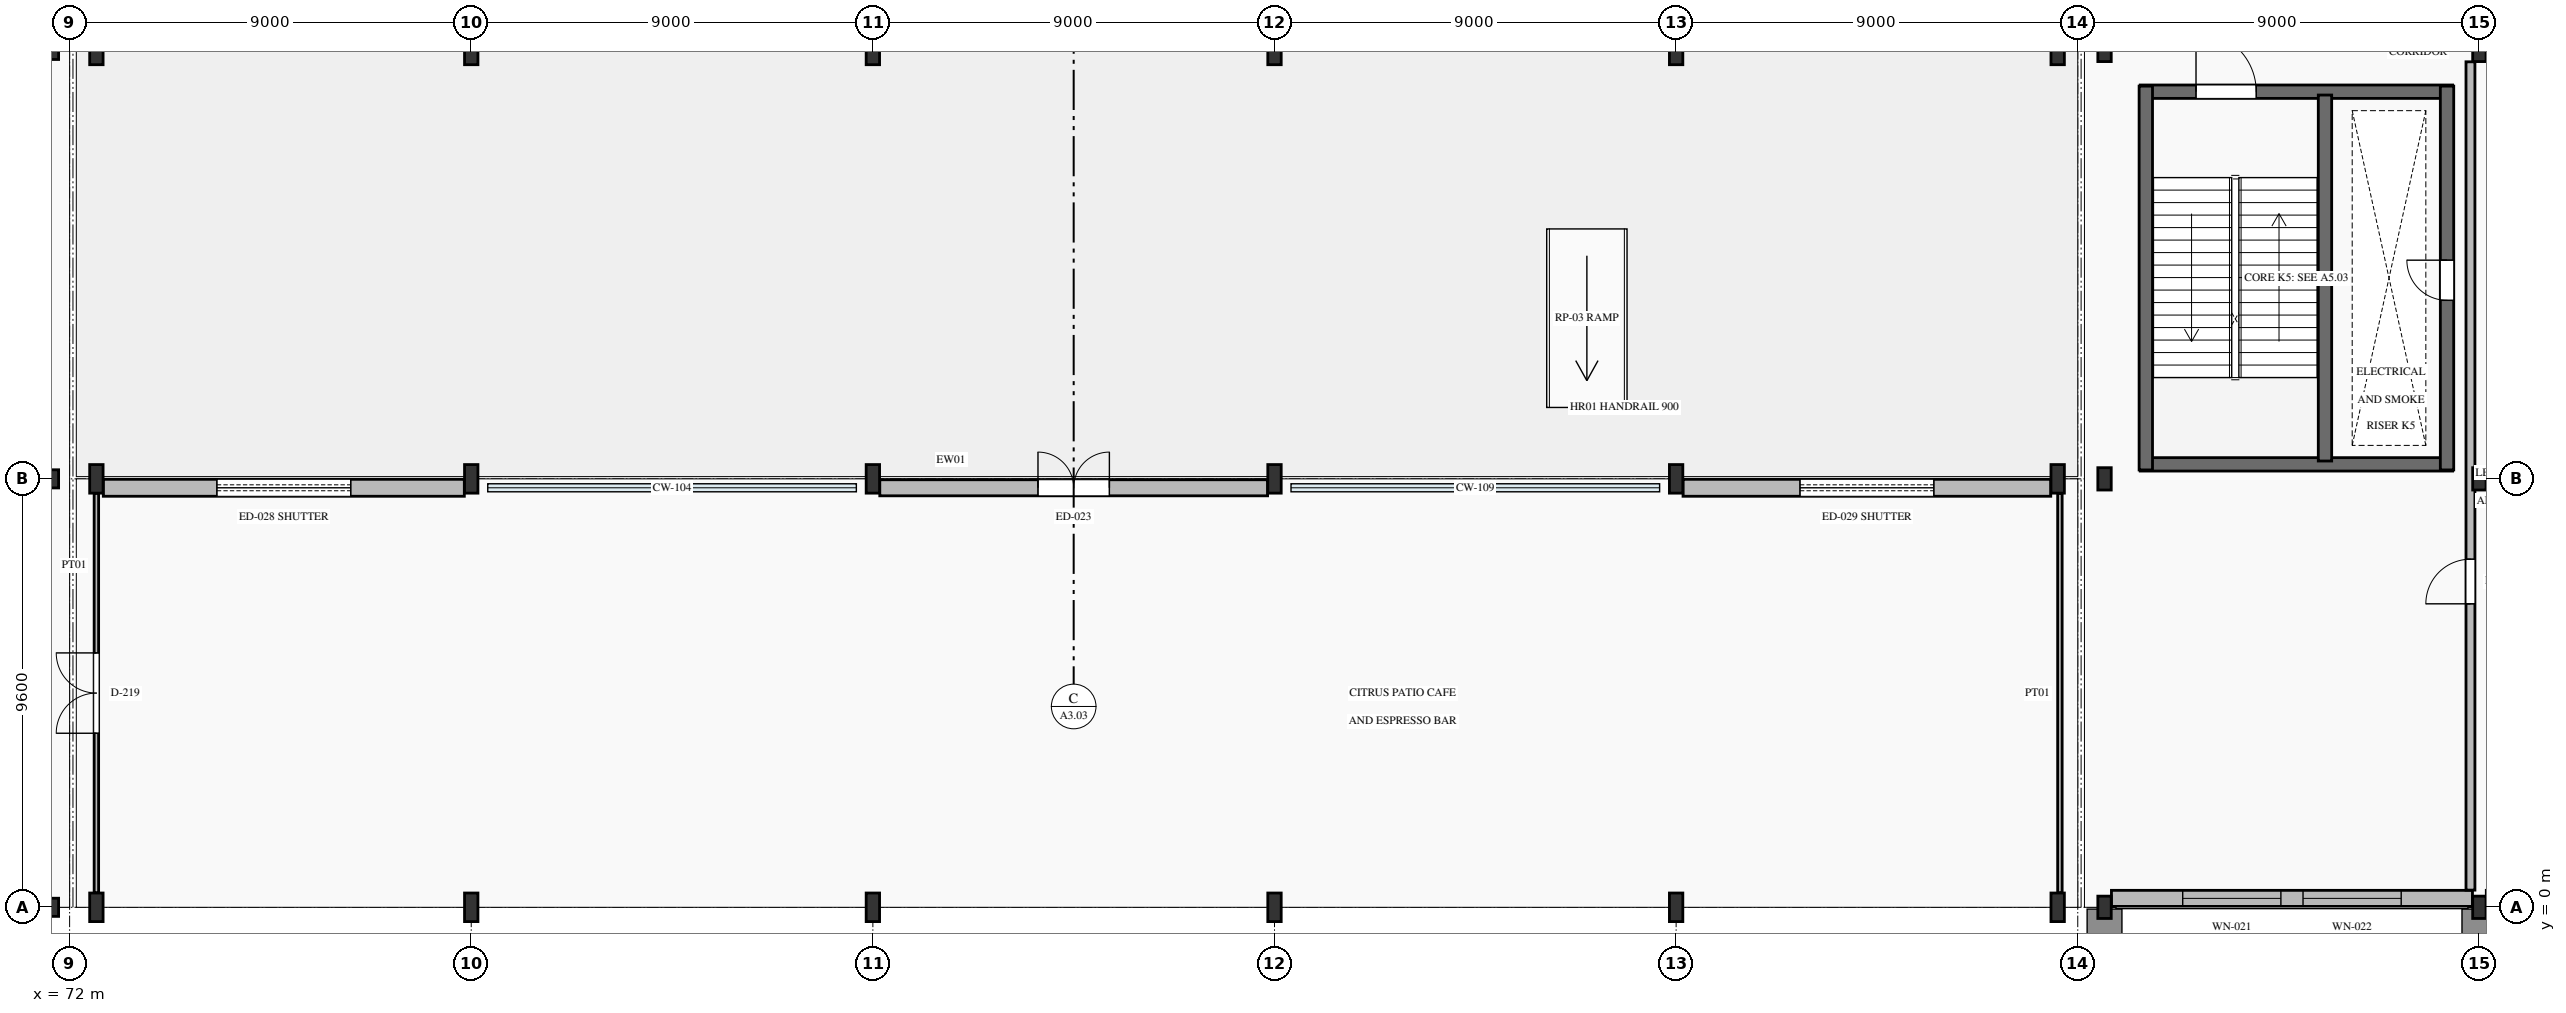
"""IFC4 building model, lengths in metres.
Left out: names, types, materials, properties, quantities, classifications, styles, units other than length and angle.
Written with IfcOpenShell. Run it as: python <this file> out.ifc"""

import sys

from ifc_helpers import new_model, si_unit, direction, frame, frame_2d, origin, origin_2d, place, context, subcontext, project, spatial, rectangle, hollow_circle, i_section, extrude, element, fill, save


model = new_model("IFC4")
c1 = context("Model", 3, precision=1e-05, world=origin(), true_north=direction((0.0, 1.0)))
c2 = subcontext(c1, "Body", "Model", "MODEL_VIEW")
j1 = project(units=[si_unit("LENGTHUNIT", "METRE"), si_unit("PLANEANGLEUNIT", "RADIAN")], contexts=[c1])
p1 = place(None, origin())
s1 = spatial("IfcSite", under=j1, at=p1, CompositionType="ELEMENT")
p2 = place(p1, origin())
s2 = spatial("IfcBuilding", under=s1, at=p2, CompositionType="ELEMENT")
p3 = place(p2, origin())
s3 = spatial("IfcBuildingStorey", under=s2, at=p3, CompositionType="ELEMENT", Elevation=0.0)
for number, where, z_axis, x_axis in (
    (1, (71.55, 0.0, 0.0), (0.0, 0.0, 1.0), (1.0, 0.0, 0.0)),
    (2, (71.55, 9.6, 0.0), (0.0, 0.0, 1.0), (1.0, 0.0, 0.0)),
    (3, (71.55, 19.2, 0.0), (0.0, 0.0, 1.0), (1.0, 0.0, 0.0)),
):
    element("IfcColumn", number, at=place(p3, frame(where, z_axis=z_axis, x_axis=x_axis)), inside=s3, PredefinedType="COLUMN", context=c2, shape_type="SweptSolid", body=[
        extrude(hollow_circle(Radius=0.203, WallThickness=0.02, at=origin_2d()), origin(), (0.0, 0.0, 1.0), 6.0),
    ])
for number, where, z_axis, x_axis in (
    (4, (72.6, 0.0, 0.0), (0.0, 0.0, 1.0), (1.0, 0.0, 0.0)),
    (5, (72.6, 9.6, 0.0), (0.0, 0.0, 1.0), (1.0, 0.0, 0.0)),
    (6, (72.6, 19.2, 0.0), (0.0, 0.0, 1.0), (1.0, 0.0, 0.0)),
    (7, (81.0, 0.0, 0.0), (0.0, 0.0, 1.0), (1.0, 0.0, 0.0)),
    (8, (81.0, 9.6, 0.0), (0.0, 0.0, 1.0), (1.0, 0.0, 0.0)),
    (9, (81.0, 19.2, 0.0), (0.0, 0.0, 1.0), (1.0, 0.0, 0.0)),
    (10, (90.0, 0.0, 0.0), (0.0, 0.0, 1.0), (1.0, 0.0, 0.0)),
    (11, (90.0, 9.6, 0.0), (0.0, 0.0, 1.0), (1.0, 0.0, 0.0)),
    (12, (90.0, 19.2, 0.0), (0.0, 0.0, 1.0), (1.0, 0.0, 0.0)),
    (13, (99.0, 0.0, 0.0), (0.0, 0.0, 1.0), (1.0, 0.0, 0.0)),
    (14, (99.0, 9.6, 0.0), (0.0, 0.0, 1.0), (1.0, 0.0, 0.0)),
    (15, (99.0, 19.2, 0.0), (0.0, 0.0, 1.0), (1.0, 0.0, 0.0)),
    (16, (108.0, 0.0, 0.0), (0.0, 0.0, 1.0), (1.0, 0.0, 0.0)),
    (17, (108.0, 9.6, 0.0), (0.0, 0.0, 1.0), (1.0, 0.0, 0.0)),
    (18, (108.0, 19.2, 0.0), (0.0, 0.0, 1.0), (1.0, 0.0, 0.0)),
    (19, (116.55, 0.0, 0.0), (0.0, 0.0, 1.0), (1.0, 0.0, 0.0)),
    (20, (116.55, 9.6, 0.0), (0.0, 0.0, 1.0), (1.0, 0.0, 0.0)),
    (21, (116.55, 19.2, 0.0), (0.0, 0.0, 1.0), (1.0, 0.0, 0.0)),
):
    element("IfcColumn", number, at=place(p3, frame(where, z_axis=z_axis, x_axis=x_axis)), inside=s3, PredefinedType="COLUMN", context=c2, shape_type="SweptSolid", body=[
        extrude(i_section(OverallWidth=0.3, OverallDepth=0.64, WebThickness=0.013, FlangeThickness=0.026, FilletRadius=0.027, at=origin_2d()), origin(), (0.0, 0.0, 1.0), 6.0),
    ])
for number, where, z_axis, x_axis in (
    (22, (117.6, 0.0, 0.0), (0.0, 0.0, 1.0), (1.0, 0.0, 0.0)),
    (23, (117.6, 9.6, 0.0), (0.0, 0.0, 1.0), (1.0, 0.0, 0.0)),
    (24, (117.6, 19.2, 0.0), (0.0, 0.0, 1.0), (1.0, 0.0, 0.0)),
    (25, (126.0, 0.0, 0.0), (0.0, 0.0, 1.0), (1.0, 0.0, 0.0)),
    (26, (126.0, 9.6, 0.0), (0.0, 0.0, 1.0), (1.0, 0.0, 0.0)),
    (27, (126.0, 19.2, 0.0), (0.0, 0.0, 1.0), (1.0, 0.0, 0.0)),
):
    element("IfcColumn", number, at=place(p3, frame(where, z_axis=z_axis, x_axis=x_axis)), inside=s3, PredefinedType="COLUMN", context=c2, shape_type="SweptSolid", body=[
        extrude(i_section(OverallWidth=0.3, OverallDepth=0.5, WebThickness=0.014, FlangeThickness=0.028, FilletRadius=0.027, at=origin_2d()), origin(), (0.0, 0.0, 1.0), 6.0),
    ])
p4 = place(p3, frame((90.155, 9.4, 0.0), z_axis=(0.0, 0.0, 1.0), x_axis=(1.0, 0.0, 0.0)))
e28 = element("IfcWall", 28, at=p4, inside=s3, PredefinedType="SOLIDWALL", context=c2, shape_type="SweptSolid", body=[
    extrude(rectangle(XDim=8.69, YDim=0.36, at=frame_2d((4.345, 0.0))), origin(), (0.0, 0.0, 1.0), 5.34),
])
p5 = place(p4, frame((3.545, 0.0, 0.0)))
e29 = element("IfcOpeningElement", 29, at=p5, cuts=e28, PredefinedType="OPENING", context=c2, shape_type="SweptSolid", body=[
    extrude(rectangle(XDim=1.6, YDim=2.4, at=frame_2d((0.8, 1.2))), frame((0.0, 0.195, 0.0), z_axis=(0.0, -1.0, 0.0), x_axis=(1.0, 0.0, 0.0)), (0.0, 0.0, 1.0), 0.39),
])
p6 = place(p3, frame((117.755, 0.2, 0.0), z_axis=(0.0, 0.0, 1.0), x_axis=(1.0, 0.0, 0.0)))
e30 = element("IfcWall", 30, at=p6, inside=s3, PredefinedType="SOLIDWALL", context=c2, shape_type="SweptSolid", body=[
    extrude(rectangle(XDim=8.09, YDim=0.36, at=frame_2d((4.045, 0.0))), origin(), (0.0, 0.0, 1.0), 5.49),
])
p7 = place(p6, frame((1.597, 0.0, 0.95)))
e31 = element("IfcOpeningElement", 31, at=p7, cuts=e30, PredefinedType="OPENING", context=c2, shape_type="SweptSolid", body=[
    extrude(rectangle(XDim=2.2, YDim=2.6, at=frame_2d((1.1, 1.3))), frame((0.0, 0.195, 0.0), z_axis=(0.0, -1.0, 0.0), x_axis=(1.0, 0.0, 0.0)), (0.0, 0.0, 1.0), 0.39),
])
p8 = place(p6, frame((4.293, 0.0, 0.95)))
e32 = element("IfcOpeningElement", 32, at=p8, cuts=e30, PredefinedType="OPENING", context=c2, shape_type="SweptSolid", body=[
    extrude(rectangle(XDim=2.2, YDim=2.6, at=frame_2d((1.1, 1.3))), frame((0.0, 0.195, 0.0), z_axis=(0.0, -1.0, 0.0), x_axis=(1.0, 0.0, 0.0)), (0.0, 0.0, 1.0), 0.39),
])
p9 = place(p3, frame((72.755, 9.4, 0.0), z_axis=(0.0, 0.0, 1.0), x_axis=(1.0, 0.0, 0.0)))
e33 = element("IfcWall", 33, at=p9, inside=s3, PredefinedType="SOLIDWALL", context=c2, shape_type="SweptSolid", body=[
    extrude(rectangle(XDim=8.09, YDim=0.38, at=frame_2d((4.045, 0.0))), origin(), (0.0, 0.0, 1.0), 5.34),
])
p10 = place(p9, frame((2.545, 0.0, 0.0)))
e34 = element("IfcOpeningElement", 34, at=p10, cuts=e33, PredefinedType="OPENING", context=c2, shape_type="SweptSolid", body=[
    extrude(rectangle(XDim=3.0, YDim=2.8, at=frame_2d((1.5, 1.4))), frame((0.0, 0.205, 0.0), z_axis=(0.0, -1.0, 0.0), x_axis=(1.0, 0.0, 0.0)), (0.0, 0.0, 1.0), 0.41),
])
p11 = place(p3, frame((108.155, 9.4, 0.0), z_axis=(0.0, 0.0, 1.0), x_axis=(1.0, 0.0, 0.0)))
e35 = element("IfcWall", 35, at=p11, inside=s3, PredefinedType="SOLIDWALL", context=c2, shape_type="SweptSolid", body=[
    extrude(rectangle(XDim=8.24, YDim=0.38, at=frame_2d((4.12, 0.0))), origin(), (0.0, 0.0, 1.0), 5.34),
])
p12 = place(p11, frame((2.62, 0.0, 0.0)))
e36 = element("IfcOpeningElement", 36, at=p12, cuts=e35, PredefinedType="OPENING", context=c2, shape_type="SweptSolid", body=[
    extrude(rectangle(XDim=3.0, YDim=2.8, at=frame_2d((1.5, 1.4))), frame((0.0, 0.205, 0.0), z_axis=(0.0, -1.0, 0.0), x_axis=(1.0, 0.0, 0.0)), (0.0, 0.0, 1.0), 0.41),
])
p13 = place(p3, frame((118.4, 9.925, 0.0), z_axis=(0.0, 0.0, 1.0), x_axis=(1.0, 0.0, 0.0)))
e37 = element("IfcWall", 37, at=p13, inside=s3, PredefinedType="SHEAR", context=c2, shape_type="SweptSolid", body=[
    extrude(rectangle(XDim=7.0, YDim=0.3, at=frame_2d((3.5, 0.0))), origin(), (0.0, 0.0, 1.0), 6.0),
])
p14 = place(p3, frame((118.4, 18.275, 0.0), z_axis=(0.0, 0.0, 1.0), x_axis=(1.0, 0.0, 0.0)))
e38 = element("IfcWall", 38, at=p14, inside=s3, PredefinedType="SHEAR", context=c2, shape_type="SweptSolid", body=[
    extrude(rectangle(XDim=7.0, YDim=0.3, at=frame_2d((3.5, 0.0))), origin(), (0.0, 0.0, 1.0), 6.0),
])
p15 = place(p14, frame((1.25, 0.0, 0.0)))
e39 = element("IfcOpeningElement", 39, at=p15, cuts=e38, PredefinedType="OPENING", context=c2, shape_type="SweptSolid", body=[
    extrude(rectangle(XDim=1.35, YDim=2.2, at=frame_2d((0.675, 1.1))), frame((0.0, 0.165, 0.0), z_axis=(0.0, -1.0, 0.0), x_axis=(1.0, 0.0, 0.0)), (0.0, 0.0, 1.0), 0.33),
])
p16 = place(p3, frame((118.525, 9.8, 0.0), z_axis=(0.0, 0.0, 1.0), x_axis=(0.0, 1.0, 0.0)))
e40 = element("IfcWall", 40, at=p16, inside=s3, PredefinedType="SHEAR", context=c2, shape_type="SweptSolid", body=[
    extrude(rectangle(XDim=8.6, YDim=0.3, at=frame_2d((4.3, 0.0))), origin(), (0.0, 0.0, 1.0), 6.0),
])
p17 = place(p3, frame((125.275, 9.8, 0.0), z_axis=(0.0, 0.0, 1.0), x_axis=(0.0, 1.0, 0.0)))
e41 = element("IfcWall", 41, at=p17, inside=s3, PredefinedType="SHEAR", context=c2, shape_type="SweptSolid", body=[
    extrude(rectangle(XDim=8.6, YDim=0.3, at=frame_2d((4.3, 0.0))), origin(), (0.0, 0.0, 1.0), 6.0),
])
p18 = place(p17, frame((3.8, 0.0, 0.0)))
e42 = element("IfcOpeningElement", 42, at=p18, cuts=e41, PredefinedType="OPENING", context=c2, shape_type="SweptSolid", body=[
    extrude(rectangle(XDim=0.9, YDim=2.05, at=frame_2d((0.45, 1.025))), frame((0.0, 0.165, 0.0), z_axis=(0.0, -1.0, 0.0), x_axis=(1.0, 0.0, 0.0)), (0.0, 0.0, 1.0), 0.33),
])
p19 = place(p3, frame((122.54, 10.0, 0.0), z_axis=(0.0, 0.0, 1.0), x_axis=(0.0, 1.0, 0.0)))
e43 = element("IfcWall", 43, at=p19, inside=s3, PredefinedType="SHEAR", context=c2, shape_type="SweptSolid", body=[
    extrude(rectangle(XDim=8.2, YDim=0.3, at=frame_2d((4.1, 0.0))), origin(), (0.0, 0.0, 1.0), 6.0),
])
p20 = place(p3, frame((72.6, 0.325, 0.0), z_axis=(0.0, 0.0, 1.0), x_axis=(0.0, 1.0, 0.0)))
e44 = element("IfcWall", 44, at=p20, inside=s3, PredefinedType="PARTITIONING", context=c2, shape_type="SweptSolid", body=[
    extrude(rectangle(XDim=8.95, YDim=0.1, at=frame_2d((4.475, 0.0))), origin(), (0.0, 0.0, 1.0), 5.19),
])
p21 = place(p20, frame((3.575, 0.0, 0.0)))
e45 = element("IfcOpeningElement", 45, at=p21, cuts=e44, PredefinedType="OPENING", context=c2, shape_type="SweptSolid", body=[
    extrude(rectangle(XDim=1.8, YDim=2.3, at=frame_2d((0.9, 1.15))), frame((0.0, 0.065, 0.0), z_axis=(0.0, -1.0, 0.0), x_axis=(1.0, 0.0, 0.0)), (0.0, 0.0, 1.0), 0.13),
])
p22 = place(p3, frame((125.8, 0.385, 0.0), z_axis=(0.0, 0.0, 1.0), x_axis=(0.0, 1.0, 0.0)))
e46 = element("IfcWall", 46, at=p22, inside=s3, PredefinedType="PARTITIONING", context=c2, shape_type="SweptSolid", body=[
    extrude(rectangle(XDim=18.56, YDim=0.2, at=frame_2d((9.28, 0.0))), origin(), (0.0, 0.0, 1.0), 5.46),
])
p23 = place(p22, frame((6.415, 0.0, 0.0)))
e47 = element("IfcOpeningElement", 47, at=p23, cuts=e46, PredefinedType="OPENING", context=c2, shape_type="SweptSolid", body=[
    extrude(rectangle(XDim=1.0, YDim=2.15, at=frame_2d((0.5, 1.075))), frame((0.0, 0.115, 0.0), z_axis=(0.0, -1.0, 0.0), x_axis=(1.0, 0.0, 0.0)), (0.0, 0.0, 1.0), 0.23),
])
p24 = place(p3, frame((116.6, 0.325, 0.0), z_axis=(0.0, 0.0, 1.0), x_axis=(0.0, 1.0, 0.0)))
e48 = element("IfcWall", 48, at=p24, inside=s3, PredefinedType="PARTITIONING", context=c2, shape_type="SweptSolid", body=[
    extrude(rectangle(XDim=8.95, YDim=0.1, at=frame_2d((4.475, 0.0))), origin(), (0.0, 0.0, 1.0), 5.41),
])
p25 = place(p5, origin())
e49 = element("IfcDoor", 49, at=p25, inside=s3, OperationType="DOUBLE_DOOR_SINGLE_SWING", PredefinedType="DOOR", context=c2, shape_type="SweptSolid", body=[
    extrude(rectangle(XDim=1.6, YDim=2.4, at=frame_2d((0.8, 1.2))), frame((0.0, 0.025, 0.0), z_axis=(0.0, -1.0, 0.0), x_axis=(1.0, 0.0, 0.0)), (0.0, 0.0, 1.0), 0.05),
])
fill(e29, e49)
p26 = place(p7, origin())
e50 = element("IfcWindow", 50, at=p26, inside=s3, PartitioningType="SINGLE_PANEL", PredefinedType="WINDOW", context=c2, shape_type="SweptSolid", body=[
    extrude(rectangle(XDim=2.2, YDim=2.6, at=frame_2d((1.1, 1.3))), frame((0.0, 0.03, 0.0), z_axis=(0.0, -1.0, 0.0), x_axis=(1.0, 0.0, 0.0)), (0.0, 0.0, 1.0), 0.06),
])
fill(e31, e50)
p27 = place(p8, origin())
e51 = element("IfcWindow", 51, at=p27, inside=s3, PartitioningType="SINGLE_PANEL", PredefinedType="WINDOW", context=c2, shape_type="SweptSolid", body=[
    extrude(rectangle(XDim=2.2, YDim=2.6, at=frame_2d((1.1, 1.3))), frame((0.0, 0.03, 0.0), z_axis=(0.0, -1.0, 0.0), x_axis=(1.0, 0.0, 0.0)), (0.0, 0.0, 1.0), 0.06),
])
fill(e32, e51)
p28 = place(p10, origin())
e52 = element("IfcDoor", 52, at=p28, inside=s3, OperationType="ROLLINGUP", PredefinedType="GATE", context=c2, shape_type="SweptSolid", body=[
    extrude(rectangle(XDim=3.0, YDim=2.8, at=frame_2d((1.5, 1.4))), frame((0.0, 0.025, 0.0), z_axis=(0.0, -1.0, 0.0), x_axis=(1.0, 0.0, 0.0)), (0.0, 0.0, 1.0), 0.05),
])
fill(e34, e52)
p29 = place(p12, origin())
e53 = element("IfcDoor", 53, at=p29, inside=s3, OperationType="ROLLINGUP", PredefinedType="GATE", context=c2, shape_type="SweptSolid", body=[
    extrude(rectangle(XDim=3.0, YDim=2.8, at=frame_2d((1.5, 1.4))), frame((0.0, 0.025, 0.0), z_axis=(0.0, -1.0, 0.0), x_axis=(1.0, 0.0, 0.0)), (0.0, 0.0, 1.0), 0.05),
])
fill(e36, e53)
p30 = place(p15, origin())
e54 = element("IfcDoor", 54, at=p30, inside=s3, OperationType="SINGLE_SWING_LEFT", PredefinedType="DOOR", context=c2, shape_type="SweptSolid", body=[
    extrude(rectangle(XDim=1.35, YDim=2.2, at=frame_2d((0.675, 1.1))), frame((0.0, 0.025, 0.0), z_axis=(0.0, -1.0, 0.0), x_axis=(1.0, 0.0, 0.0)), (0.0, 0.0, 1.0), 0.05),
])
fill(e39, e54)
p31 = place(p18, origin())
e55 = element("IfcDoor", 55, at=p31, inside=s3, OperationType="SINGLE_SWING_RIGHT", PredefinedType="DOOR", context=c2, shape_type="SweptSolid", body=[
    extrude(rectangle(XDim=0.9, YDim=2.05, at=frame_2d((0.45, 1.025))), frame((0.0, 0.025, 0.0), z_axis=(0.0, -1.0, 0.0), x_axis=(1.0, 0.0, 0.0)), (0.0, 0.0, 1.0), 0.05),
])
fill(e42, e55)
p32 = place(p21, origin())
e56 = element("IfcDoor", 56, at=p32, inside=s3, OperationType="DOUBLE_DOOR_SINGLE_SWING", PredefinedType="DOOR", context=c2, shape_type="SweptSolid", body=[
    extrude(rectangle(XDim=1.8, YDim=2.3, at=frame_2d((0.9, 1.15))), frame((0.0, 0.025, 0.0), z_axis=(0.0, -1.0, 0.0), x_axis=(1.0, 0.0, 0.0)), (0.0, 0.0, 1.0), 0.05),
])
fill(e45, e56)
p33 = place(p23, origin())
e57 = element("IfcDoor", 57, at=p33, inside=s3, OperationType="SINGLE_SWING_LEFT", PredefinedType="DOOR", context=c2, shape_type="SweptSolid", body=[
    extrude(rectangle(XDim=1.0, YDim=2.15, at=frame_2d((0.5, 1.075))), frame((0.0, 0.025, 0.0), z_axis=(0.0, -1.0, 0.0), x_axis=(1.0, 0.0, 0.0)), (0.0, 0.0, 1.0), 0.05),
])
fill(e47, e57)
save(model, sys.argv[1])
